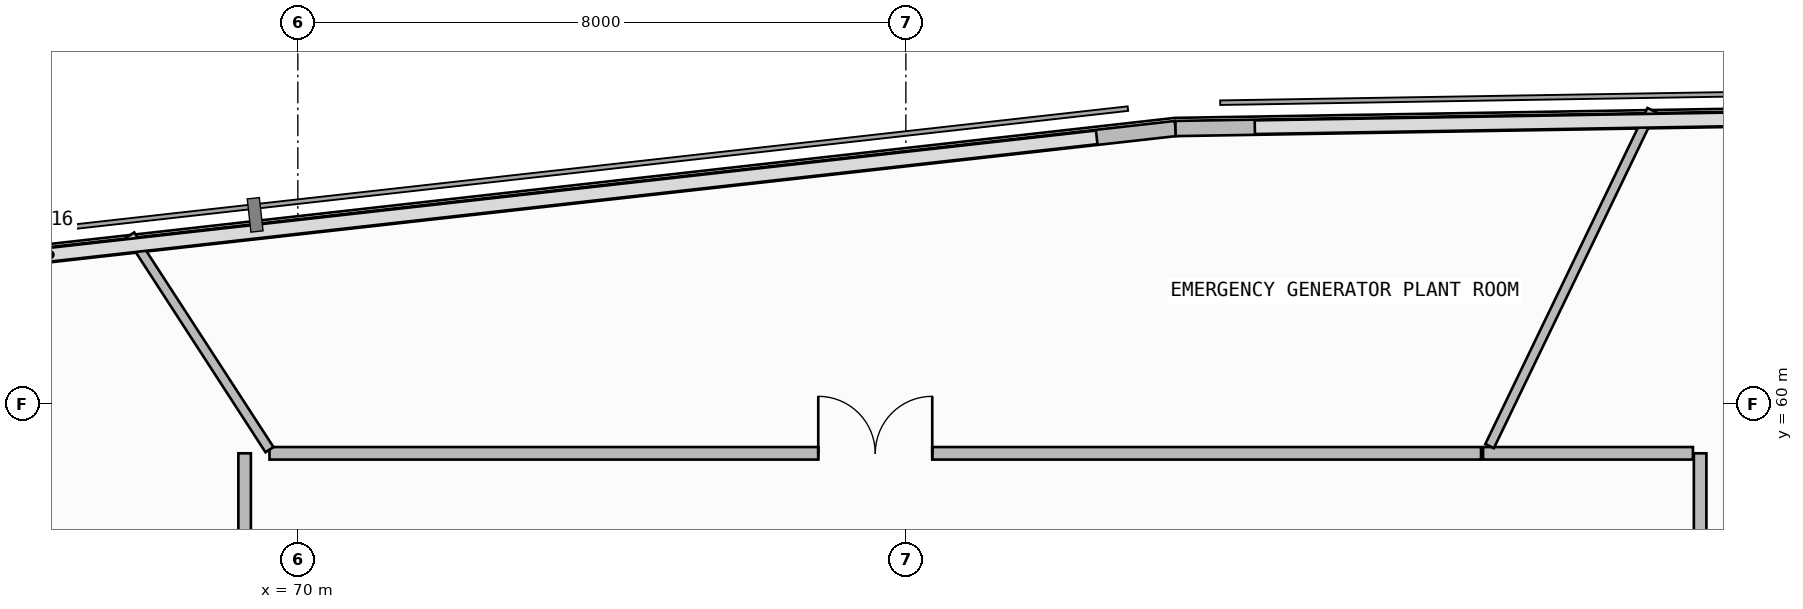
"""IFC4 building model, lengths in metres.
Left out: names, types, materials, properties, quantities, classifications, styles, units other than length and angle.
Written with IfcOpenShell. Run it as: python <this file> out.ifc"""

import sys

from ifc_helpers import new_model, si_unit, direction, frame, frame_2d, origin, place, context, subcontext, project, spatial, rectangle, extrude, element, fill, save


model = new_model("IFC4")
c1 = context("Model", 3, precision=1e-05, world=origin(), true_north=direction((0.0, 1.0)))
c2 = subcontext(c1, "Body", "Model", "MODEL_VIEW")
j1 = project(units=[si_unit("LENGTHUNIT", "METRE"), si_unit("PLANEANGLEUNIT", "RADIAN")], contexts=[c1])
p1 = place(None, origin())
s1 = spatial("IfcSite", under=j1, at=p1, CompositionType="ELEMENT")
p2 = place(p1, origin())
s2 = spatial("IfcBuilding", under=s1, at=p2, CompositionType="ELEMENT")
p3 = place(p2, frame((0.0, 0.0, 302.98)))
s3 = spatial("IfcBuildingStorey", under=s2, at=p3, CompositionType="ELEMENT", Elevation=302.98)
p4 = place(p3, frame((51.936, 60.304, 0.0), z_axis=(0.0, 0.0, 1.0), x_axis=(0.993776757355, 0.111390109707, 0.0)))
e1 = element("IfcWall", 1, at=p4, inside=s3, PredefinedType="PARAPET", context=c2, shape_type="SweptSolid", body=[
    extrude(rectangle(XDim=29.797, YDim=0.2, at=frame_2d((14.898, 0.0))), origin(), (0.0, 0.0, 1.0), 1.15),
])
p5 = place(p3, frame((81.548, 63.623, 0.0), z_axis=(0.0, 0.0, 1.0), x_axis=(0.999864617327, 0.016454392015, 0.0)))
e2 = element("IfcWall", 2, at=p5, inside=s3, PredefinedType="PARAPET", context=c2, shape_type="SweptSolid", body=[
    extrude(rectangle(XDim=29.779, YDim=0.2, at=frame_2d((14.889, 0.0))), origin(), (0.0, 0.0, 1.0), 1.15),
])
p6 = place(p3, frame((88.45, 46.244, 0.0), z_axis=(0.0, 0.0, 1.0), x_axis=(0.0, 1.0, 0.0)))
e3 = element("IfcWall", 3, at=p6, inside=s3, PredefinedType="PARTITIONING", context=c2, shape_type="SweptSolid", body=[
    extrude(rectangle(XDim=13.106, YDim=0.165, at=frame_2d((6.553, 0.0))), origin(), (0.0, 0.0, 1.0), 4.085),
])
p7 = place(p6, frame((5.803, 0.0, 0.0)))
e4 = element("IfcOpeningElement", 4, at=p7, cuts=e3, PredefinedType="OPENING", context=c2, shape_type="SweptSolid", body=[
    extrude(rectangle(XDim=1.5, YDim=2.25, at=frame_2d((0.75, 1.125))), frame((0.0, 0.093, 0.0), z_axis=(0.0, -1.0, 0.0), x_axis=(1.0, 0.0, 0.0)), (0.0, 0.0, 1.0), 0.185),
])
p8 = place(p3, frame((88.355, 59.35, 0.0), z_axis=(0.0, 0.0, 1.0), x_axis=(-1.0, 0.0, 0.0)))
e5 = element("IfcWall", 5, at=p8, inside=s3, PredefinedType="PARTITIONING", context=c2, shape_type="SweptSolid", body=[
    extrude(rectangle(XDim=2.761, YDim=0.165, at=frame_2d((1.381, 0.0))), origin(), (0.0, 0.0, 1.0), 4.085),
])
p9 = place(p3, frame((85.68, 59.445, 0.0), z_axis=(0.0, 0.0, 1.0), x_axis=(0.434516788422, 0.900663733354, 0.0)))
e6 = element("IfcWall", 6, at=p9, inside=s3, PredefinedType="PARTITIONING", context=c2, shape_type="SweptSolid", body=[
    extrude(rectangle(XDim=4.909, YDim=0.125, at=frame_2d((2.455, 0.0))), origin(), (0.0, 0.0, 1.0), 4.6),
])
p10 = place(p3, frame((85.567, 59.35, 0.0), z_axis=(0.0, 0.0, 1.0), x_axis=(-1.0, 0.0, 0.0)))
e7 = element("IfcWall", 7, at=p10, inside=s3, PredefinedType="PARTITIONING", context=c2, shape_type="SweptSolid", body=[
    extrude(rectangle(XDim=15.94, YDim=0.165, at=frame_2d((7.97, 0.0))), origin(), (0.0, 0.0, 1.0), 4.6),
])
p11 = place(p10, frame((7.22, 0.0, 0.0)))
e8 = element("IfcOpeningElement", 8, at=p11, cuts=e7, PredefinedType="OPENING", context=c2, shape_type="SweptSolid", body=[
    extrude(rectangle(XDim=1.5, YDim=2.25, at=frame_2d((0.75, 1.125))), frame((0.0, 0.093, 0.0), z_axis=(0.0, -1.0, 0.0), x_axis=(1.0, 0.0, 0.0)), (0.0, 0.0, 1.0), 0.185),
])
p12 = place(p3, frame((69.627, 59.398, 0.0), z_axis=(0.0, 0.0, 1.0), x_axis=(-0.544077969561, 0.839034661404, 0.0)))
e9 = element("IfcWall", 9, at=p12, inside=s3, PredefinedType="PARTITIONING", context=c2, shape_type="SweptSolid", body=[
    extrude(rectangle(XDim=3.366, YDim=0.125, at=frame_2d((1.683, 0.0))), origin(), (0.0, 0.0, 1.0), 4.6),
])
p13 = place(p3, frame((69.3, 59.35, 0.0), z_axis=(0.0, 0.0, 1.0), x_axis=(0.0, -1.0, 0.0)))
e10 = element("IfcWall", 10, at=p13, inside=s3, PredefinedType="PARTITIONING", context=c2, shape_type="SweptSolid", body=[
    extrude(rectangle(XDim=14.361, YDim=0.165, at=frame_2d((7.18, 0.0))), origin(), (0.0, 0.0, 1.0), 4.085),
])
p14 = place(p13, frame((8.299, 0.0, 0.0)))
e11 = element("IfcOpeningElement", 11, at=p14, cuts=e10, PredefinedType="OPENING", context=c2, shape_type="SweptSolid", body=[
    extrude(rectangle(XDim=1.5, YDim=2.25, at=frame_2d((0.75, 1.125))), frame((0.0, 0.093, 0.0), z_axis=(0.0, -1.0, 0.0), x_axis=(1.0, 0.0, 0.0)), (0.0, 0.0, 1.0), 0.185),
])
p15 = place(p11, frame((1.5, 0.0, 0.0), z_axis=(0.0, 0.0, 1.0), x_axis=(-1.0, 0.0, 0.0)))
e12 = element("IfcDoor", 12, at=p15, inside=s3, OperationType="DOUBLE_DOOR_SINGLE_SWING", PredefinedType="DOOR", context=c2, shape_type="SweptSolid", body=[
    extrude(rectangle(XDim=1.5, YDim=2.25, at=frame_2d((0.75, 1.125))), frame((0.0, 0.025, 0.0), z_axis=(0.0, -1.0, 0.0), x_axis=(1.0, 0.0, 0.0)), (0.0, 0.0, 1.0), 0.05),
])
fill(e8, e12)
save(model, sys.argv[1])
